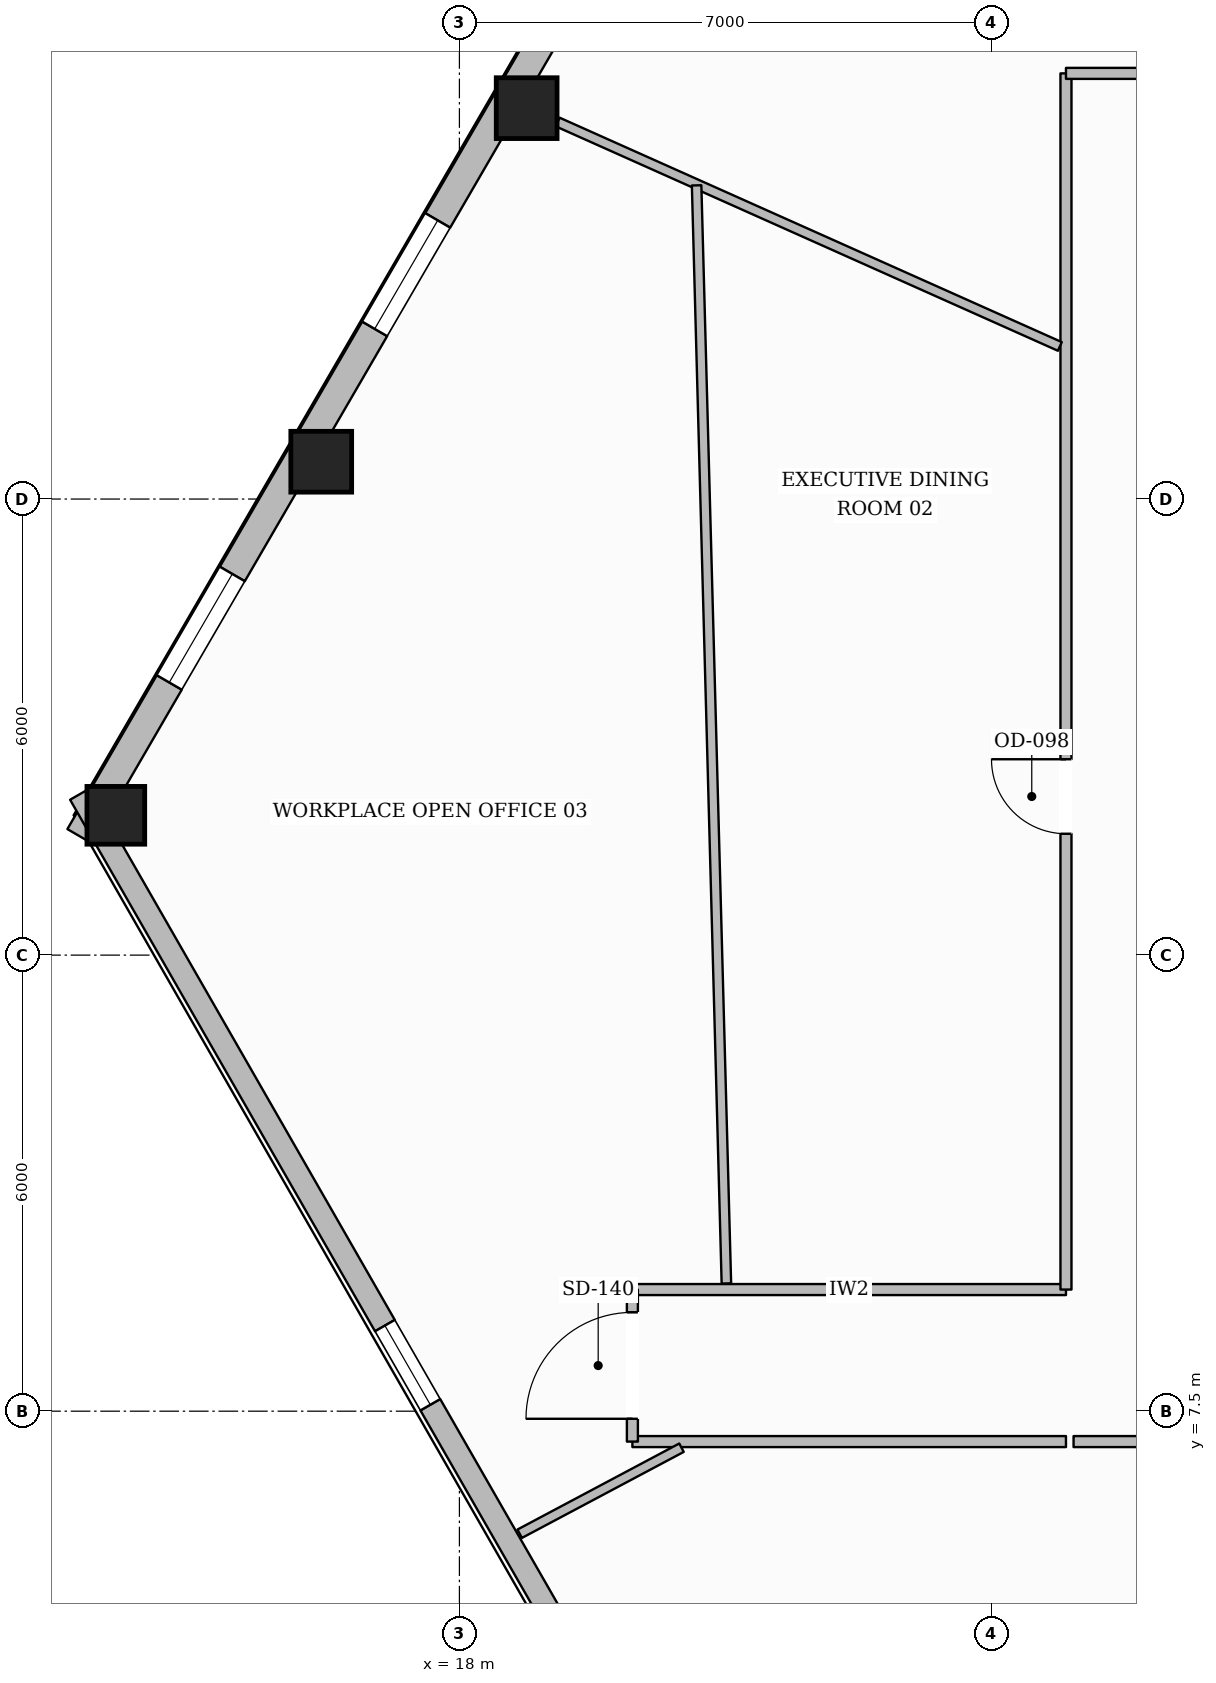
"""IFC4 building model, lengths in metres.
Left out: names, types, materials, properties, quantities, classifications, styles, units other than length and angle.
Written with IfcOpenShell. Run it as: python <this file> out.ifc"""

import sys

from ifc_helpers import new_model, si_unit, direction, frame, frame_2d, origin, origin_2d, place, context, subcontext, project, spatial, rectangle, hollow_rectangle, extrude, element, fill, save


model = new_model("IFC4")
c1 = context("Model", 3, precision=1e-05, world=origin(), true_north=direction((0.0, 1.0)))
c2 = subcontext(c1, "Body", "Model", "MODEL_VIEW")
j1 = project(units=[si_unit("LENGTHUNIT", "METRE"), si_unit("PLANEANGLEUNIT", "RADIAN")], contexts=[c1])
p1 = place(None, origin())
s1 = spatial("IfcSite", under=j1, at=p1, CompositionType="ELEMENT")
p2 = place(p1, origin())
s2 = spatial("IfcBuilding", under=s1, at=p2, CompositionType="ELEMENT")
p3 = place(p2, frame((0.0, 0.0, 6.0)))
s3 = spatial("IfcBuildingStorey", under=s2, at=p3, CompositionType="ELEMENT", Elevation=6.0)
for number, where, z_axis, x_axis in (
    (1, (18.885, 24.643, 0.0), (0.0, 0.0, 1.0), (1.0, 0.0, 0.0)),
    (2, (16.182, 19.991, 0.0), (0.0, 0.0, 1.0), (1.0, 0.0, 0.0)),
):
    element("IfcColumn", number, at=place(p3, frame(where, z_axis=z_axis, x_axis=x_axis)), inside=s3, PredefinedType="COLUMN", context=c2, shape_type="SweptSolid", body=[
        extrude(hollow_rectangle(XDim=0.8, YDim=0.8, WallThickness=0.036, at=origin_2d()), origin(), (0.0, 0.0, 1.0), 3.59),
    ])
p4 = place(p3, frame((13.48, 15.339, 0.0), z_axis=(0.0, 0.0, 1.0), x_axis=(1.0, 0.0, 0.0)))
e3 = element("IfcColumn", 3, at=p4, inside=s3, PredefinedType="COLUMN", context=c2, shape_type="SweptSolid", body=[
    extrude(hollow_rectangle(XDim=0.76, YDim=0.76, WallThickness=0.035, at=origin_2d()), origin(), (0.0, 0.0, 1.0), 3.59),
])
p5 = place(p3, frame((13.007, 15.062, 0.0), z_axis=(0.0, 0.0, 1.0), x_axis=(0.502349968378, 0.86466439112, 0.0)))
e4 = element("IfcWall", 4, at=p5, inside=s3, PredefinedType="STANDARD", context=c2, shape_type="SweptSolid", body=[
    extrude(rectangle(XDim=33.229, YDim=0.38, at=frame_2d((16.615, 0.0))), origin(), (0.0, 0.0, 1.0), 2.97),
])
p6 = place(p5, frame((29.24, 0.0, 0.65)))
e5 = element("IfcOpeningElement", 5, at=p6, cuts=e4, PredefinedType="OPENING", context=c2, shape_type="SweptSolid", body=[
    extrude(rectangle(XDim=1.65, YDim=1.75, at=frame_2d((0.825, 0.875))), frame((0.0, 0.2, 0.0), z_axis=(0.0, -1.0, 0.0), x_axis=(1.0, 0.0, 0.0)), (0.0, 0.0, 1.0), 0.4),
])
p7 = place(p5, frame((23.861, 0.0, 0.65)))
e6 = element("IfcOpeningElement", 6, at=p7, cuts=e4, PredefinedType="OPENING", context=c2, shape_type="SweptSolid", body=[
    extrude(rectangle(XDim=1.65, YDim=1.75, at=frame_2d((0.825, 0.875))), frame((0.0, 0.2, 0.0), z_axis=(0.0, -1.0, 0.0), x_axis=(1.0, 0.0, 0.0)), (0.0, 0.0, 1.0), 0.4),
])
p8 = place(p5, frame((13.101, 0.0, 0.65)))
e7 = element("IfcOpeningElement", 7, at=p8, cuts=e4, PredefinedType="OPENING", context=c2, shape_type="SweptSolid", body=[
    extrude(rectangle(XDim=1.65, YDim=1.75, at=frame_2d((0.825, 0.875))), frame((0.0, 0.2, 0.0), z_axis=(0.0, -1.0, 0.0), x_axis=(1.0, 0.0, 0.0)), (0.0, 0.0, 1.0), 0.4),
])
p9 = place(p5, frame((7.722, 0.0, 0.65)))
e8 = element("IfcOpeningElement", 8, at=p9, cuts=e4, PredefinedType="OPENING", context=c2, shape_type="SweptSolid", body=[
    extrude(rectangle(XDim=1.65, YDim=1.75, at=frame_2d((0.825, 0.875))), frame((0.0, 0.2, 0.0), z_axis=(0.0, -1.0, 0.0), x_axis=(1.0, 0.0, 0.0)), (0.0, 0.0, 1.0), 0.4),
])
p10 = place(p5, frame((2.342, 0.0, 0.65)))
e9 = element("IfcOpeningElement", 9, at=p10, cuts=e4, PredefinedType="OPENING", context=c2, shape_type="SweptSolid", body=[
    extrude(rectangle(XDim=1.65, YDim=1.75, at=frame_2d((0.825, 0.875))), frame((0.0, 0.2, 0.0), z_axis=(0.0, -1.0, 0.0), x_axis=(1.0, 0.0, 0.0)), (0.0, 0.0, 1.0), 0.4),
])
p11 = place(p3, frame((21.629, 0.592, 0.0), z_axis=(0.0, 0.0, 1.0), x_axis=(-0.497614882017, 0.867398080004, 0.0)))
e10 = element("IfcWall", 10, at=p11, inside=s3, PredefinedType="STANDARD", context=c2, shape_type="SweptSolid", body=[
    extrude(rectangle(XDim=17.324, YDim=0.3, at=frame_2d((8.662, 0.0))), origin(), (0.0, 0.0, 1.0), 2.97),
])
p12 = place(p11, frame((8.062, 0.0, 0.65)))
e11 = element("IfcOpeningElement", 11, at=p12, cuts=e10, PredefinedType="OPENING", context=c2, shape_type="SweptSolid", body=[
    extrude(rectangle(XDim=1.2, YDim=1.7, at=frame_2d((0.6, 0.85))), frame((0.0, 0.16, 0.0), z_axis=(0.0, -1.0, 0.0), x_axis=(1.0, 0.0, 0.0)), (0.0, 0.0, 1.0), 0.32),
])
p13 = place(p3, frame((20.276, 9.1, 0.0), z_axis=(0.0, 0.0, 1.0), x_axis=(1.0, 0.0, 0.0)))
e12 = element("IfcWall", 12, at=p13, inside=s3, PredefinedType="PARTITIONING", context=c2, shape_type="SweptSolid", body=[
    extrude(rectangle(XDim=5.704, YDim=0.145, at=frame_2d((2.852, 0.0))), origin(), (0.0, 0.0, 1.0), 3.59),
])
p14 = place(p3, frame((25.98, 9.1, 0.0), z_axis=(0.0, 0.0, 1.0), x_axis=(0.0, 1.0, 0.0)))
e13 = element("IfcWall", 13, at=p14, inside=s3, PredefinedType="PARTITIONING", context=c2, shape_type="SweptSolid", body=[
    extrude(rectangle(XDim=16.0, YDim=0.145, at=frame_2d((8.0, 0.0))), origin(), (0.0, 0.0, 1.0), 3.278),
])
p15 = place(p14, frame((5.997, 0.0, 0.0)))
e14 = element("IfcOpeningElement", 14, at=p15, cuts=e13, PredefinedType="OPENING", context=c2, shape_type="SweptSolid", body=[
    extrude(rectangle(XDim=0.98, YDim=2.15, at=frame_2d((0.49, 1.075))), frame((0.0, 0.083, 0.0), z_axis=(0.0, -1.0, 0.0), x_axis=(1.0, 0.0, 0.0)), (0.0, 0.0, 1.0), 0.165),
])
p16 = place(p3, frame((25.98, 25.1, 0.0), z_axis=(0.0, 0.0, 1.0), x_axis=(1.0, 0.0, 0.0)))
e15 = element("IfcWall", 15, at=p16, inside=s3, PredefinedType="PARTITIONING", context=c2, shape_type="SweptSolid", body=[
    extrude(rectangle(XDim=11.02, YDim=0.145, at=frame_2d((5.51, 0.0))), origin(), (0.0, 0.0, 1.0), 3.59),
])
p17 = place(p16, frame((3.38, 0.0, 0.0)))
e16 = element("IfcOpeningElement", 16, at=p17, cuts=e15, PredefinedType="OPENING", context=c2, shape_type="SweptSolid", body=[
    extrude(rectangle(XDim=0.88, YDim=2.1, at=frame_2d((0.44, 1.05))), frame((0.0, 0.083, 0.0), z_axis=(0.0, -1.0, 0.0), x_axis=(1.0, 0.0, 0.0)), (0.0, 0.0, 1.0), 0.165),
])
p18 = place(p16, frame((5.9, 0.0, 0.0)))
e17 = element("IfcOpeningElement", 17, at=p18, cuts=e15, PredefinedType="OPENING", context=c2, shape_type="SweptSolid", body=[
    extrude(rectangle(XDim=0.88, YDim=2.1, at=frame_2d((0.44, 1.05))), frame((0.0, 0.083, 0.0), z_axis=(0.0, -1.0, 0.0), x_axis=(1.0, 0.0, 0.0)), (0.0, 0.0, 1.0), 0.165),
])
p19 = place(p16, frame((8.28, 0.0, 0.0)))
e18 = element("IfcOpeningElement", 18, at=p19, cuts=e15, PredefinedType="OPENING", context=c2, shape_type="SweptSolid", body=[
    extrude(rectangle(XDim=0.96, YDim=2.1, at=frame_2d((0.48, 1.05))), frame((0.0, 0.083, 0.0), z_axis=(0.0, -1.0, 0.0), x_axis=(1.0, 0.0, 0.0)), (0.0, 0.0, 1.0), 0.165),
])
p20 = place(p3, frame((49.92, 7.1, 0.0), z_axis=(0.0, 0.0, 1.0), x_axis=(-1.0, 0.0, 0.0)))
e19 = element("IfcWall", 19, at=p20, inside=s3, PredefinedType="PARTITIONING", context=c2, shape_type="SweptSolid", body=[
    extrude(rectangle(XDim=23.84, YDim=0.145, at=frame_2d((11.92, 0.0))), origin(), (0.0, 0.0, 1.0), 3.278),
])
p21 = place(p20, frame((12.496, 0.0, 0.0)))
e20 = element("IfcOpeningElement", 20, at=p21, cuts=e19, PredefinedType="OPENING", context=c2, shape_type="SweptSolid", body=[
    extrude(rectangle(XDim=1.02, YDim=2.15, at=frame_2d((0.51, 1.075))), frame((0.0, 0.083, 0.0), z_axis=(0.0, -1.0, 0.0), x_axis=(1.0, 0.0, 0.0)), (0.0, 0.0, 1.0), 0.165),
])
p22 = place(p3, frame((25.98, 7.1, 0.0), z_axis=(0.0, 0.0, 1.0), x_axis=(-1.0, 0.0, 0.0)))
e21 = element("IfcWall", 21, at=p22, inside=s3, PredefinedType="PARTITIONING", context=c2, shape_type="SweptSolid", body=[
    extrude(rectangle(XDim=5.704, YDim=0.145, at=frame_2d((2.852, 0.0))), origin(), (0.0, 0.0, 1.0), 3.59),
])
p23 = place(p3, frame((20.276, 7.1, 0.0), z_axis=(0.0, 0.0, 1.0), x_axis=(0.0, 1.0, 0.0)))
e22 = element("IfcWall", 22, at=p23, inside=s3, PredefinedType="PARTITIONING", context=c2, shape_type="SweptSolid", body=[
    extrude(rectangle(XDim=2.0, YDim=0.145, at=frame_2d((1.0, 0.0))), origin(), (0.0, 0.0, 1.0), 3.59),
])
p24 = place(p23, frame((0.3, 0.0, 0.0)))
e23 = element("IfcOpeningElement", 23, at=p24, cuts=e22, PredefinedType="OPENING", context=c2, shape_type="SweptSolid", body=[
    extrude(rectangle(XDim=1.4, YDim=2.2, at=frame_2d((0.7, 1.1))), frame((0.0, 0.083, 0.0), z_axis=(0.0, -1.0, 0.0), x_axis=(1.0, 0.0, 0.0)), (0.0, 0.0, 1.0), 0.165),
])
p25 = place(p3, frame((25.899, 21.508, 0.0), z_axis=(0.0, 0.0, 1.0), x_axis=(-0.912984646815, 0.407993915004, 0.0)))
e24 = element("IfcWall", 24, at=p25, inside=s3, PredefinedType="PARTITIONING", context=c2, shape_type="SweptSolid", body=[
    extrude(rectangle(XDim=7.236, YDim=0.125, at=frame_2d((3.618, 0.0))), origin(), (0.0, 0.0, 1.0), 3.057),
])
p26 = place(p3, frame((20.922, 7.02, 0.0), z_axis=(0.0, 0.0, 1.0), x_axis=(-0.882971496937, -0.469426602992, 0.0)))
e25 = element("IfcWall", 25, at=p26, inside=s3, PredefinedType="PARTITIONING", context=c2, shape_type="SweptSolid", body=[
    extrude(rectangle(XDim=2.412, YDim=0.125, at=frame_2d((1.206, 0.0))), origin(), (0.0, 0.0, 1.0), 3.59),
])
p27 = place(p3, frame((21.121, 23.627, 0.0), z_axis=(0.0, 0.0, 1.0), x_axis=(0.027114342991, -0.999632338615, 0.0)))
e26 = element("IfcWall", 26, at=p27, inside=s3, PredefinedType="PARTITIONING", context=c2, shape_type="SweptSolid", body=[
    extrude(rectangle(XDim=14.452, YDim=0.125, at=frame_2d((7.226, 0.0))), origin(), (0.0, 0.0, 1.0), 3.278),
])
p28 = place(p9, origin())
e27 = element("IfcWindow", 27, at=p28, inside=s3, PartitioningType="SINGLE_PANEL", PredefinedType="WINDOW", context=c2, shape_type="SweptSolid", body=[
    extrude(rectangle(XDim=1.65, YDim=1.75, at=frame_2d((0.825, 0.875))), frame((0.0, 0.03, 0.0), z_axis=(0.0, -1.0, 0.0), x_axis=(1.0, 0.0, 0.0)), (0.0, 0.0, 1.0), 0.06),
])
fill(e8, e27)
p29 = place(p10, origin())
e28 = element("IfcWindow", 28, at=p29, inside=s3, PartitioningType="SINGLE_PANEL", PredefinedType="WINDOW", context=c2, shape_type="SweptSolid", body=[
    extrude(rectangle(XDim=1.65, YDim=1.75, at=frame_2d((0.825, 0.875))), frame((0.0, 0.03, 0.0), z_axis=(0.0, -1.0, 0.0), x_axis=(1.0, 0.0, 0.0)), (0.0, 0.0, 1.0), 0.06),
])
fill(e9, e28)
p30 = place(p12, origin())
e29 = element("IfcWindow", 29, at=p30, inside=s3, PartitioningType="SINGLE_PANEL", PredefinedType="WINDOW", context=c2, shape_type="SweptSolid", body=[
    extrude(rectangle(XDim=1.2, YDim=1.7, at=frame_2d((0.6, 0.85))), frame((0.0, 0.03, 0.0), z_axis=(0.0, -1.0, 0.0), x_axis=(1.0, 0.0, 0.0)), (0.0, 0.0, 1.0), 0.06),
])
fill(e11, e29)
p31 = place(p15, origin())
e30 = element("IfcDoor", 30, at=p31, inside=s3, OperationType="SINGLE_SWING_RIGHT", PredefinedType="DOOR", context=c2, shape_type="SweptSolid", body=[
    extrude(rectangle(XDim=0.98, YDim=2.15, at=frame_2d((0.49, 1.075))), frame((0.0, 0.025, 0.0), z_axis=(0.0, -1.0, 0.0), x_axis=(1.0, 0.0, 0.0)), (0.0, 0.0, 1.0), 0.05),
])
fill(e14, e30)
p32 = place(p24, origin())
e31 = element("IfcDoor", 31, at=p32, inside=s3, OperationType="SINGLE_SWING_LEFT", PredefinedType="DOOR", context=c2, shape_type="SweptSolid", body=[
    extrude(rectangle(XDim=1.4, YDim=2.2, at=frame_2d((0.7, 1.1))), frame((0.0, 0.025, 0.0), z_axis=(0.0, -1.0, 0.0), x_axis=(1.0, 0.0, 0.0)), (0.0, 0.0, 1.0), 0.05),
])
fill(e23, e31)
save(model, sys.argv[1])
